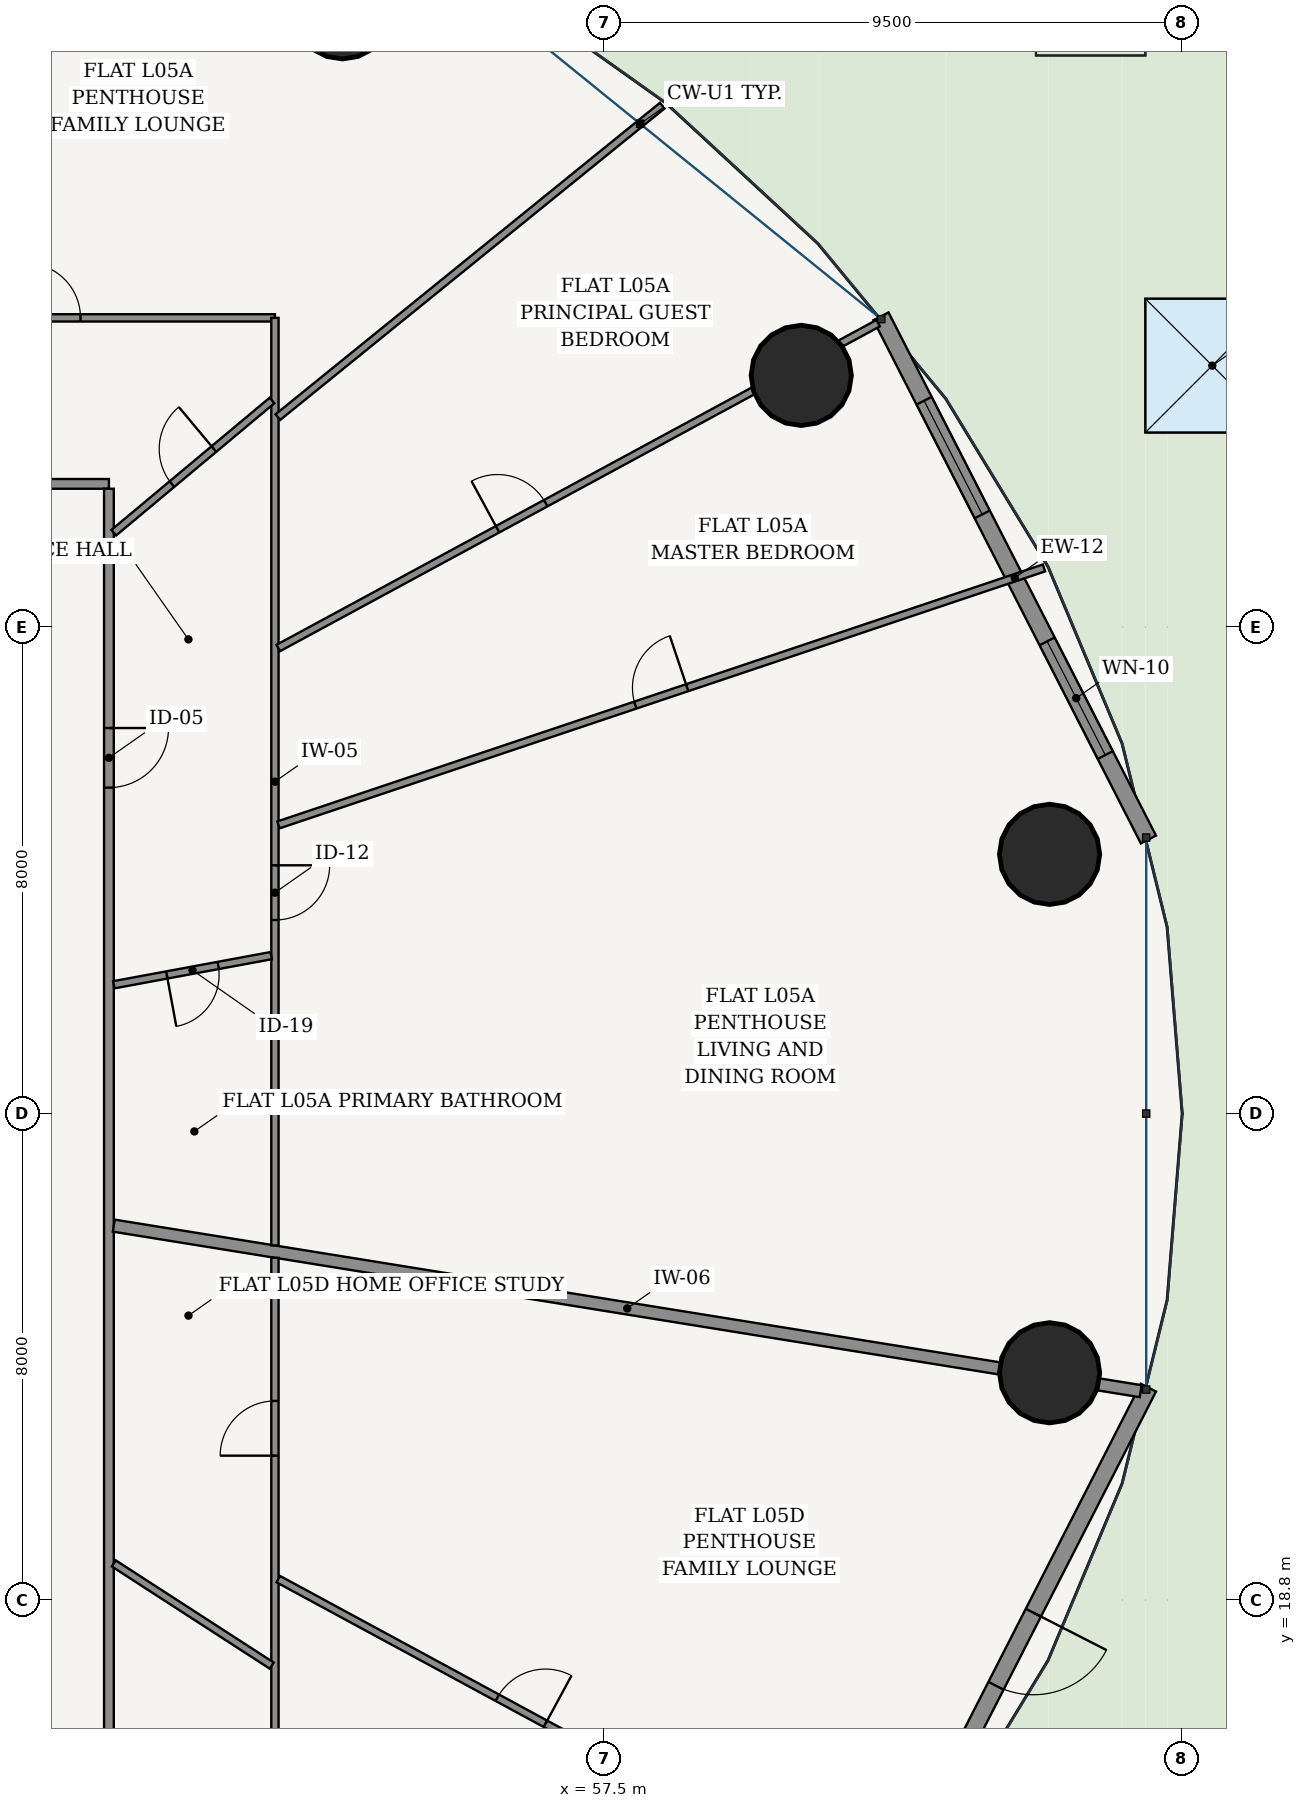
"""IFC4 building model, lengths in metres.
Left out: names, types, materials, properties, quantities, classifications, styles, units other than length and angle.
Written with IfcOpenShell. Run it as: python <this file> out.ifc"""

import sys

from ifc_helpers import new_model, si_unit, direction, frame, frame_2d, origin, origin_2d, place, context, subcontext, project, spatial, rectangle, hollow_circle, extrude, source, transform, mapped, element, fill, save


model = new_model("IFC4")
c1 = context("Model", 3, precision=1e-05, world=origin(), true_north=direction((-0.2419218956, 0.970295726276)))
c2 = subcontext(c1, "Body", "Model", "MODEL_VIEW")
j1 = project(units=[si_unit("LENGTHUNIT", "METRE"), si_unit("PLANEANGLEUNIT", "RADIAN")], contexts=[c1])
p1 = place(None, origin())
s1 = spatial("IfcSite", under=j1, at=p1, CompositionType="ELEMENT")
p2 = place(p1, origin())
s2 = spatial("IfcBuilding", under=s1, at=p2, CompositionType="ELEMENT")
p3 = place(p2, frame((0.0, 0.0, 24.0)))
s3 = spatial("IfcBuildingStorey", under=s2, at=p3, CompositionType="ELEMENT", Elevation=24.0)
for number, where, z_axis, x_axis in (
    (1, (64.824, 31.063, 0.0), (0.0, 0.0, 1.0), (1.0, 0.0, 0.0)),
    (2, (60.741, 38.939, 0.0), (0.0, 0.0, 1.0), (1.0, 0.0, 0.0)),
    (3, (53.195, 44.968, 0.0), (0.0, 0.0, 1.0), (1.0, 0.0, 0.0)),
    (4, (64.824, 22.537, 0.0), (0.0, 0.0, 1.0), (1.0, 0.0, 0.0)),
):
    element("IfcColumn", number, at=place(p3, frame(where, z_axis=z_axis, x_axis=x_axis)), inside=s3, PredefinedType="COLUMN", context=c2, shape_type="SweptSolid", body=[
        extrude(hollow_circle(Radius=0.825, WallThickness=0.05, at=origin_2d()), origin(), (0.0, 0.0, 1.0), 3.6),
    ])
p4 = place(p3, frame((66.45, 31.308, 0.0), z_axis=(0.0, 0.0, 1.0), x_axis=(-0.45523081716, 0.890373462715, 0.0)))
e5 = element("IfcWall", 5, at=p4, inside=s3, PredefinedType="SOLIDWALL", context=c2, shape_type="SweptSolid", body=[
    extrude(rectangle(XDim=9.662, YDim=0.28, at=frame_2d((4.831, 0.0))), origin(), (0.0, 0.0, 1.0), 3.32),
])
p5 = place(p4, frame((1.559, 0.0, 0.85)))
e6 = element("IfcOpeningElement", 6, at=p5, cuts=e5, PredefinedType="OPENING", context=c2, shape_type="SweptSolid", body=[
    extrude(rectangle(XDim=2.1, YDim=1.95, at=frame_2d((1.05, 0.975))), frame((0.0, 0.15, 0.0), z_axis=(0.0, -1.0, 0.0), x_axis=(1.0, 0.0, 0.0)), (0.0, 0.0, 1.0), 0.3),
])
p6 = place(p4, frame((6.003, 0.0, 0.85)))
e7 = element("IfcOpeningElement", 7, at=p6, cuts=e5, PredefinedType="OPENING", context=c2, shape_type="SweptSolid", body=[
    extrude(rectangle(XDim=2.1, YDim=1.95, at=frame_2d((1.05, 0.975))), frame((0.0, 0.15, 0.0), z_axis=(0.0, -1.0, 0.0), x_axis=(1.0, 0.0, 0.0)), (0.0, 0.0, 1.0), 0.3),
])
p7 = place(p3, frame((62.051, 13.689, 0.0), z_axis=(0.0, 0.0, 1.0), x_axis=(0.455220575541, 0.890378698984, 0.0)))
e8 = element("IfcWall", 8, at=p7, inside=s3, PredefinedType="SOLIDWALL", context=c2, shape_type="SweptSolid", body=[
    extrude(rectangle(XDim=9.662, YDim=0.28, at=frame_2d((4.831, 0.0))), origin(), (0.0, 0.0, 1.0), 3.32),
])
p8 = place(p7, frame((4.156, 0.0, 0.0)))
e9 = element("IfcOpeningElement", 9, at=p8, cuts=e8, PredefinedType="OPENING", context=c2, shape_type="SweptSolid", body=[
    extrude(rectangle(XDim=1.35, YDim=2.2, at=frame_2d((0.675, 1.1))), frame((0.0, 0.15, 0.0), z_axis=(0.0, -1.0, 0.0), x_axis=(1.0, 0.0, 0.0)), (0.0, 0.0, 1.0), 0.3),
])
p9 = place(p3, frame((26.645, 37.155, 0.0), z_axis=(0.0, 0.0, 1.0), x_axis=(1.0, 0.0, 0.0)))
e10 = element("IfcWall", 10, at=p9, inside=s3, PredefinedType="PARTITIONING", context=c2, shape_type="SweptSolid", body=[
    extrude(rectangle(XDim=22.71, YDim=0.16, at=frame_2d((11.355, 0.0))), origin(), (0.0, 0.0, 1.0), 2.688),
])
p10 = place(p9, frame((7.446, 0.0, 0.0)))
e11 = element("IfcOpeningElement", 11, at=p10, cuts=e10, PredefinedType="OPENING", context=c2, shape_type="SweptSolid", body=[
    extrude(rectangle(XDim=0.98, YDim=2.2, at=frame_2d((0.49, 1.1))), frame((0.0, 0.09, 0.0), z_axis=(0.0, -1.0, 0.0), x_axis=(1.0, 0.0, 0.0)), (0.0, 0.0, 1.0), 0.18),
])
p11 = place(p3, frame((49.355, 16.525, 0.0), z_axis=(0.0, 0.0, 1.0), x_axis=(0.0, 1.0, 0.0)))
e12 = element("IfcWall", 12, at=p11, inside=s3, PredefinedType="PARTITIONING", context=c2, shape_type="SweptSolid", body=[
    extrude(rectangle(XDim=20.55, YDim=0.16, at=frame_2d((10.275, 0.0))), origin(), (0.0, 0.0, 1.0), 2.688),
])
p12 = place(p11, frame((15.635, 0.0, 0.0)))
e13 = element("IfcOpeningElement", 13, at=p12, cuts=e12, PredefinedType="OPENING", context=c2, shape_type="SweptSolid", body=[
    extrude(rectangle(XDim=0.98, YDim=2.2, at=frame_2d((0.49, 1.1))), frame((0.0, 0.09, 0.0), z_axis=(0.0, -1.0, 0.0), x_axis=(1.0, 0.0, 0.0)), (0.0, 0.0, 1.0), 0.18),
])
p13 = place(p3, frame((49.435, 24.957, 0.0), z_axis=(0.0, 0.0, 1.0), x_axis=(0.987258195973, -0.159126536076, 0.0)))
e14 = element("IfcWall", 14, at=p13, inside=s3, PredefinedType="PARTITIONING", context=c2, shape_type="SweptSolid", body=[
    extrude(rectangle(XDim=17.105, YDim=0.2, at=frame_2d((8.553, 0.0))), origin(), (0.0, 0.0, 1.0), 2.688),
])
p14 = place(p3, frame((44.791, 39.885, 0.0), z_axis=(0.0, 0.0, 1.0), x_axis=(1.0, 0.0, 0.0)))
e15 = element("IfcWall", 15, at=p14, inside=s3, PredefinedType="PARTITIONING", context=c2, shape_type="SweptSolid", body=[
    extrude(rectangle(XDim=7.294, YDim=0.12, at=frame_2d((3.647, 0.0))), origin(), (0.0, 0.0, 1.0), 2.688),
])
p15 = place(p14, frame((3.197, 0.0, 0.0)))
e16 = element("IfcOpeningElement", 16, at=p15, cuts=e15, PredefinedType="OPENING", context=c2, shape_type="SweptSolid", body=[
    extrude(rectangle(XDim=0.9, YDim=2.15, at=frame_2d((0.45, 1.075))), frame((0.0, 0.07, 0.0), z_axis=(0.0, -1.0, 0.0), x_axis=(1.0, 0.0, 0.0)), (0.0, 0.0, 1.0), 0.14),
])
p16 = place(p3, frame((52.085, 39.885, 0.0), z_axis=(0.0, 0.0, 1.0), x_axis=(0.0, -1.0, 0.0)))
e17 = element("IfcWall", 17, at=p16, inside=s3, PredefinedType="PARTITIONING", context=c2, shape_type="SweptSolid", body=[
    extrude(rectangle(XDim=15.253, YDim=0.12, at=frame_2d((7.627, 0.0))), origin(), (0.0, 0.0, 1.0), 2.688),
])
p17 = place(p16, frame((9.002, 0.0, 0.0)))
e18 = element("IfcOpeningElement", 18, at=p17, cuts=e17, PredefinedType="OPENING", context=c2, shape_type="SweptSolid", body=[
    extrude(rectangle(XDim=0.9, YDim=2.15, at=frame_2d((0.45, 1.075))), frame((0.0, 0.07, 0.0), z_axis=(0.0, -1.0, 0.0), x_axis=(1.0, 0.0, 0.0)), (0.0, 0.0, 1.0), 0.14),
])
p18 = place(p3, frame((52.144, 31.547, 0.0), z_axis=(0.0, 0.0, 1.0), x_axis=(0.948017487737, 0.318218231634, 0.0)))
e19 = element("IfcWall", 19, at=p18, inside=s3, PredefinedType="PARTITIONING", context=c2, shape_type="SweptSolid", body=[
    extrude(rectangle(XDim=13.279, YDim=0.12, at=frame_2d((6.639, 0.0))), origin(), (0.0, 0.0, 1.0), 2.762),
])
p19 = place(p18, frame((6.189, 0.0, 0.0)))
e20 = element("IfcOpeningElement", 20, at=p19, cuts=e19, PredefinedType="OPENING", context=c2, shape_type="SweptSolid", body=[
    extrude(rectangle(XDim=0.9, YDim=2.15, at=frame_2d((0.45, 1.075))), frame((0.0, 0.07, 0.0), z_axis=(0.0, -1.0, 0.0), x_axis=(1.0, 0.0, 0.0)), (0.0, 0.0, 1.0), 0.14),
])
p20 = place(p3, frame((52.139, 34.456, 0.0), z_axis=(0.0, 0.0, 1.0), x_axis=(0.879372452045, 0.476134529922, 0.0)))
e21 = element("IfcWall", 21, at=p20, inside=s3, PredefinedType="PARTITIONING", context=c2, shape_type="SweptSolid", body=[
    extrude(rectangle(XDim=11.219, YDim=0.12, at=frame_2d((5.61, 0.0))), origin(), (0.0, 0.0, 1.0), 2.688),
])
p21 = place(p20, frame((4.102, 0.0, 0.0)))
e22 = element("IfcOpeningElement", 22, at=p21, cuts=e21, PredefinedType="OPENING", context=c2, shape_type="SweptSolid", body=[
    extrude(rectangle(XDim=0.9, YDim=2.15, at=frame_2d((0.45, 1.075))), frame((0.0, 0.07, 0.0), z_axis=(0.0, -1.0, 0.0), x_axis=(1.0, 0.0, 0.0)), (0.0, 0.0, 1.0), 0.14),
])
p22 = place(p3, frame((52.133, 38.253, 0.0), z_axis=(0.0, 0.0, 1.0), x_axis=(0.776936623447, 0.629578814087, 0.0)))
e23 = element("IfcWall", 23, at=p22, inside=s3, PredefinedType="PARTITIONING", context=c2, shape_type="SweptSolid", body=[
    extrude(rectangle(XDim=8.136, YDim=0.12, at=frame_2d((4.068, 0.0))), origin(), (0.0, 0.0, 1.0), 2.762),
])
p23 = place(p3, frame((49.435, 28.918, 0.0), z_axis=(0.0, 0.0, 1.0), x_axis=(0.983277085422, 0.182115823818, 0.0)))
e24 = element("IfcWall", 24, at=p23, inside=s3, PredefinedType="PARTITIONING", context=c2, shape_type="SweptSolid", body=[
    extrude(rectangle(XDim=2.633, YDim=0.12, at=frame_2d((1.316, 0.0))), origin(), (0.0, 0.0, 1.0), 3.32),
])
p24 = place(p23, frame((0.886, 0.0, 0.0)))
e25 = element("IfcOpeningElement", 25, at=p24, cuts=e24, PredefinedType="OPENING", context=c2, shape_type="SweptSolid", body=[
    extrude(rectangle(XDim=0.86, YDim=2.15, at=frame_2d((0.43, 1.075))), frame((0.0, 0.07, 0.0), z_axis=(0.0, -1.0, 0.0), x_axis=(1.0, 0.0, 0.0)), (0.0, 0.0, 1.0), 0.14),
])
p25 = place(p3, frame((49.435, 36.353, 0.0), z_axis=(0.0, 0.0, 1.0), x_axis=(0.76742398833, 0.641139939589, 0.0)))
e26 = element("IfcWall", 26, at=p25, inside=s3, PredefinedType="PARTITIONING", context=c2, shape_type="SweptSolid", body=[
    extrude(rectangle(XDim=3.391, YDim=0.12, at=frame_2d((1.695, 0.0))), origin(), (0.0, 0.0, 1.0), 2.999),
])
p26 = place(p25, frame((1.246, 0.0, 0.0)))
e27 = element("IfcOpeningElement", 27, at=p26, cuts=e26, PredefinedType="OPENING", context=c2, shape_type="SweptSolid", body=[
    extrude(rectangle(XDim=0.9, YDim=2.15, at=frame_2d((0.45, 1.075))), frame((0.0, 0.07, 0.0), z_axis=(0.0, -1.0, 0.0), x_axis=(1.0, 0.0, 0.0)), (0.0, 0.0, 1.0), 0.14),
])
p27 = place(p3, frame((43.335, 37.237, 0.0), z_axis=(0.0, 0.0, 1.0), x_axis=(0.455148959499, 0.890415310216, 0.0)))
e28 = element("IfcWall", 28, at=p27, inside=s3, PredefinedType="PARTITIONING", context=c2, shape_type="SweptSolid", body=[
    extrude(rectangle(XDim=12.598, YDim=0.2, at=frame_2d((6.299, 0.0))), origin(), (0.0, 0.0, 1.0), 2.762),
])
p28 = place(p3, frame((52.085, 24.428, 0.0), z_axis=(0.0, 0.0, 1.0), x_axis=(0.0, -1.0, 0.0)))
e29 = element("IfcWall", 29, at=p28, inside=s3, PredefinedType="PARTITIONING", context=c2, shape_type="SweptSolid", body=[
    extrude(rectangle(XDim=10.713, YDim=0.12, at=frame_2d((5.356, 0.0))), origin(), (0.0, 0.0, 1.0), 2.688),
])
p29 = place(p28, frame((8.094, 0.0, 0.0)))
e30 = element("IfcOpeningElement", 30, at=p29, cuts=e29, PredefinedType="OPENING", context=c2, shape_type="SweptSolid", body=[
    extrude(rectangle(XDim=0.9, YDim=2.15, at=frame_2d((0.45, 1.075))), frame((0.0, 0.07, 0.0), z_axis=(0.0, -1.0, 0.0), x_axis=(1.0, 0.0, 0.0)), (0.0, 0.0, 1.0), 0.14),
])
p30 = place(p28, frame((2.354, 0.0, 0.0)))
e31 = element("IfcOpeningElement", 31, at=p30, cuts=e29, PredefinedType="OPENING", context=c2, shape_type="SweptSolid", body=[
    extrude(rectangle(XDim=0.9, YDim=2.15, at=frame_2d((0.45, 1.075))), frame((0.0, 0.07, 0.0), z_axis=(0.0, -1.0, 0.0), x_axis=(1.0, 0.0, 0.0)), (0.0, 0.0, 1.0), 0.14),
])
p31 = place(p3, frame((52.139, 19.144, 0.0), z_axis=(0.0, 0.0, 1.0), x_axis=(0.879372452045, -0.476134529922, 0.0)))
e32 = element("IfcWall", 32, at=p31, inside=s3, PredefinedType="PARTITIONING", context=c2, shape_type="SweptSolid", body=[
    extrude(rectangle(XDim=11.219, YDim=0.12, at=frame_2d((5.61, 0.0))), origin(), (0.0, 0.0, 1.0), 2.688),
])
p32 = place(p31, frame((4.097, 0.0, 0.0)))
e33 = element("IfcOpeningElement", 33, at=p32, cuts=e32, PredefinedType="OPENING", context=c2, shape_type="SweptSolid", body=[
    extrude(rectangle(XDim=0.9, YDim=2.15, at=frame_2d((0.45, 1.075))), frame((0.0, 0.07, 0.0), z_axis=(0.0, -1.0, 0.0), x_axis=(1.0, 0.0, 0.0)), (0.0, 0.0, 1.0), 0.14),
])
p33 = place(p3, frame((49.435, 19.402, 0.0), z_axis=(0.0, 0.0, 1.0), x_axis=(0.839582858019, -0.543231649042, 0.0)))
e34 = element("IfcWall", 34, at=p33, inside=s3, PredefinedType="PARTITIONING", context=c2, shape_type="SweptSolid", body=[
    extrude(rectangle(XDim=3.094, YDim=0.12, at=frame_2d((1.547, 0.0))), origin(), (0.0, 0.0, 1.0), 3.32),
])
m1 = source(origin(), c2, "Body", "SweptSolid", [
    extrude(rectangle(XDim=2.1, YDim=1.95, at=frame_2d((1.05, 0.975))), frame((0.0, 0.03, 0.0), z_axis=(0.0, -1.0, 0.0), x_axis=(1.0, 0.0, 0.0)), (0.0, 0.0, 1.0), 0.06),
])
p34 = place(p5, origin())
e35 = element("IfcWindow", 35, at=p34, inside=s3, PartitioningType="SINGLE_PANEL", PredefinedType="WINDOW", context=c2, shape_type="MappedRepresentation", body=[
    mapped(m1, transform((0.0, 0.0, 0.0), scale=1.0)),
])
fill(e6, e35)
p35 = place(p6, origin())
e36 = element("IfcWindow", 36, at=p35, inside=s3, PartitioningType="SINGLE_PANEL", PredefinedType="WINDOW", context=c2, shape_type="MappedRepresentation", body=[
    mapped(m1, transform((0.0, 0.0, 0.0), scale=1.0)),
])
fill(e7, e36)
m2 = source(origin(), c2, "Body", "SweptSolid", [
    extrude(rectangle(XDim=1.35, YDim=2.2, at=frame_2d((0.675, 1.1))), frame((0.0, 0.025, 0.0), z_axis=(0.0, -1.0, 0.0), x_axis=(1.0, 0.0, 0.0)), (0.0, 0.0, 1.0), 0.05),
])
p36 = place(p8, frame((1.35, 0.0, 0.0), z_axis=(0.0, 0.0, 1.0), x_axis=(-1.0, 0.0, 0.0)))
e37 = element("IfcDoor", 37, at=p36, inside=s3, OperationType="SINGLE_SWING_LEFT", PredefinedType="DOOR", context=c2, shape_type="MappedRepresentation", body=[
    mapped(m2, transform((0.0, 0.0, 0.0), scale=1.0)),
])
fill(e9, e37)
p37 = place(p3, frame((0.0, 0.0, -0.3)))
p38 = place(p37, frame((67.5, 39.1, 0.0)))
p39 = place(p38, frame((0.0, 0.0, 0.26)))
e38 = element("IfcWindow", 38, at=p39, inside=s3, PartitioningType="SINGLE_PANEL", PredefinedType="SKYLIGHT", context=c2, shape_type="SweptSolid", body=[
    extrude(rectangle(XDim=2.2, YDim=2.2, at=origin_2d()), origin(), (0.0, 0.0, 1.0), 0.04),
])
m3 = source(origin(), c2, "Body", "SweptSolid", [
    extrude(rectangle(XDim=0.98, YDim=2.2, at=frame_2d((0.49, 1.1))), frame((0.0, 0.025, 0.0), z_axis=(0.0, -1.0, 0.0), x_axis=(1.0, 0.0, 0.0)), (0.0, 0.0, 1.0), 0.05),
])
p40 = place(p12, frame((0.98, 0.0, 0.0), z_axis=(0.0, 0.0, 1.0), x_axis=(-1.0, 0.0, 0.0)))
e39 = element("IfcDoor", 39, at=p40, inside=s3, OperationType="SINGLE_SWING_LEFT", PredefinedType="DOOR", context=c2, shape_type="MappedRepresentation", body=[
    mapped(m3, transform((0.0, 0.0, 0.0), scale=1.0)),
])
fill(e13, e39)
m4 = source(origin(), c2, "Body", "SweptSolid", [
    extrude(rectangle(XDim=0.86, YDim=2.15, at=frame_2d((0.43, 1.075))), frame((0.0, 0.025, 0.0), z_axis=(0.0, -1.0, 0.0), x_axis=(1.0, 0.0, 0.0)), (0.0, 0.0, 1.0), 0.05),
])
p41 = place(p24, frame((0.86, 0.0, 0.0), z_axis=(0.0, 0.0, 1.0), x_axis=(-1.0, 0.0, 0.0)))
e40 = element("IfcDoor", 40, at=p41, inside=s3, OperationType="SINGLE_SWING_RIGHT", PredefinedType="DOOR", context=c2, shape_type="MappedRepresentation", body=[
    mapped(m4, transform((0.0, 0.0, 0.0), scale=1.0)),
])
fill(e25, e40)
m5 = source(origin(), c2, "Body", "SweptSolid", [
    extrude(rectangle(XDim=0.9, YDim=2.15, at=frame_2d((0.45, 1.075))), frame((0.0, 0.025, 0.0), z_axis=(0.0, -1.0, 0.0), x_axis=(1.0, 0.0, 0.0)), (0.0, 0.0, 1.0), 0.05),
])
p42 = place(p17, origin())
e41 = element("IfcDoor", 41, at=p42, inside=s3, OperationType="SINGLE_SWING_LEFT", PredefinedType="DOOR", context=c2, shape_type="MappedRepresentation", body=[
    mapped(m5, transform((0.0, 0.0, 0.0), scale=1.0)),
])
fill(e18, e41)
p43 = place(p26, origin())
e42 = element("IfcDoor", 42, at=p43, inside=s3, OperationType="SINGLE_SWING_RIGHT", PredefinedType="DOOR", context=c2, shape_type="MappedRepresentation", body=[
    mapped(m5, transform((0.0, 0.0, 0.0), scale=1.0)),
])
fill(e27, e42)
p44 = place(p15, origin())
e43 = element("IfcDoor", 43, at=p44, inside=s3, OperationType="SINGLE_SWING_LEFT", PredefinedType="DOOR", context=c2, shape_type="MappedRepresentation", body=[
    mapped(m5, transform((0.0, 0.0, 0.0), scale=1.0)),
])
fill(e16, e43)
p45 = place(p19, origin())
e44 = element("IfcDoor", 44, at=p45, inside=s3, OperationType="SINGLE_SWING_RIGHT", PredefinedType="DOOR", context=c2, shape_type="MappedRepresentation", body=[
    mapped(m5, transform((0.0, 0.0, 0.0), scale=1.0)),
])
fill(e20, e44)
p46 = place(p21, origin())
e45 = element("IfcDoor", 45, at=p46, inside=s3, OperationType="SINGLE_SWING_LEFT", PredefinedType="DOOR", context=c2, shape_type="MappedRepresentation", body=[
    mapped(m5, transform((0.0, 0.0, 0.0), scale=1.0)),
])
fill(e22, e45)
p47 = place(p32, origin())
e46 = element("IfcDoor", 46, at=p47, inside=s3, OperationType="SINGLE_SWING_RIGHT", PredefinedType="DOOR", context=c2, shape_type="MappedRepresentation", body=[
    mapped(m5, transform((0.0, 0.0, 0.0), scale=1.0)),
])
fill(e33, e46)
p48 = place(p30, frame((0.9, 0.0, 0.0), z_axis=(0.0, 0.0, 1.0), x_axis=(-1.0, 0.0, 0.0)))
e47 = element("IfcDoor", 47, at=p48, inside=s3, OperationType="SINGLE_SWING_LEFT", PredefinedType="DOOR", context=c2, shape_type="MappedRepresentation", body=[
    mapped(m5, transform((0.0, 0.0, 0.0), scale=1.0)),
])
fill(e31, e47)
save(model, sys.argv[1])
